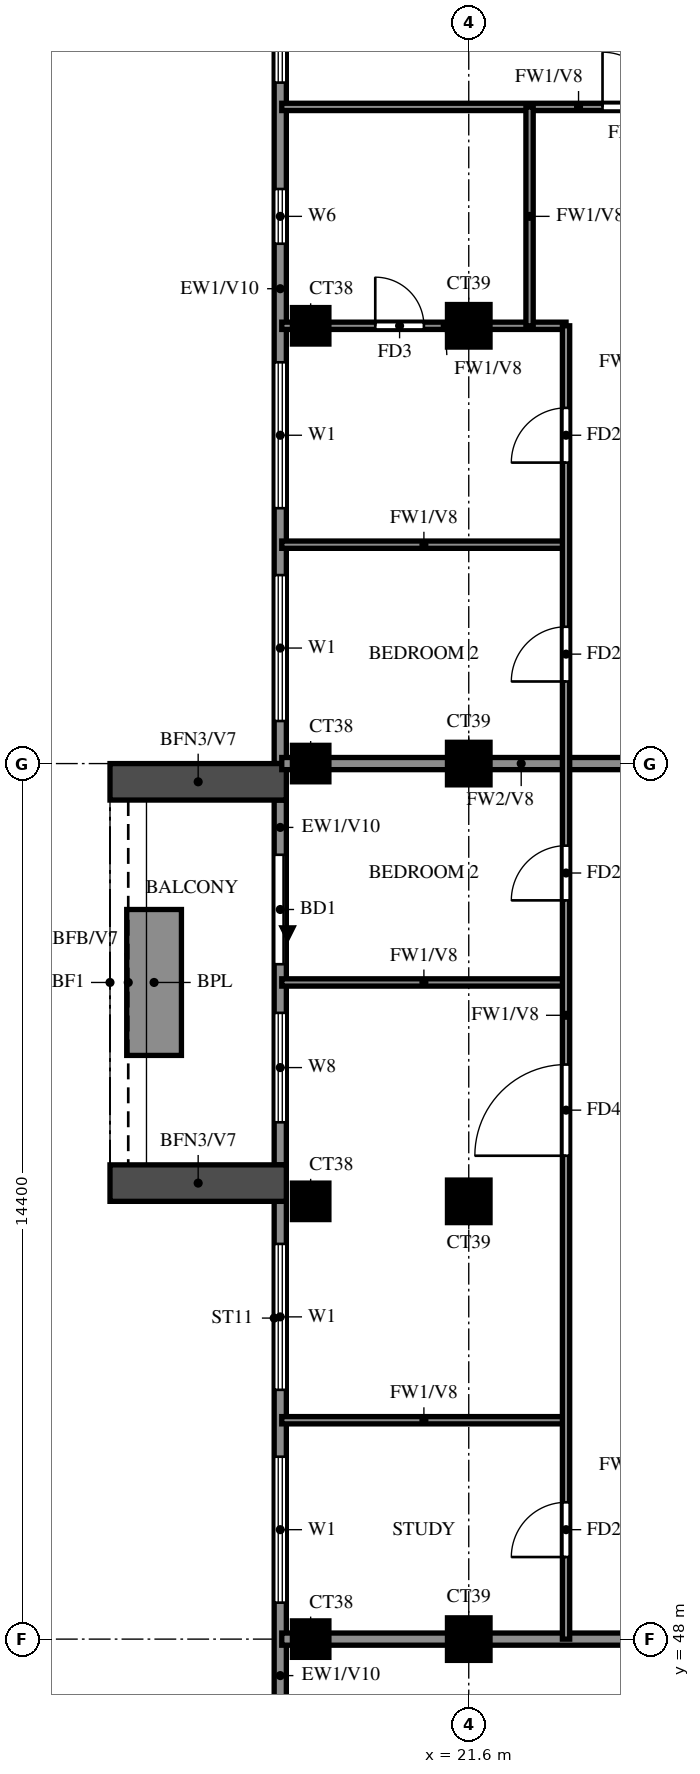
"""IFC4 building model, lengths in metres.
Left out: names, types, materials, properties, quantities, classifications, styles, units other than length and angle.
Written with IfcOpenShell. Run it as: python <this file> out.ifc"""

import sys

from ifc_helpers import new_model, si_unit, direction, frame, frame_2d, origin, origin_2d, place, context, subcontext, project, spatial, rectangle, extrude, source, transform, mapped, element, fill, save


model = new_model("IFC4")
c1 = context("Model", 3, precision=1e-05, world=origin(), true_north=direction((0.0, 1.0)))
c2 = subcontext(c1, "Body", "Model", "MODEL_VIEW")
j1 = project(units=[si_unit("LENGTHUNIT", "METRE"), si_unit("PLANEANGLEUNIT", "RADIAN")], contexts=[c1])
p1 = place(None, origin())
s1 = spatial("IfcSite", under=j1, at=p1, CompositionType="ELEMENT")
p2 = place(p1, origin())
s2 = spatial("IfcBuilding", under=s1, at=p2, CompositionType="ELEMENT")
p3 = place(p2, frame((0.0, 0.0, 267.5)))
s3 = spatial("IfcBuildingStorey", under=s2, at=p3, CompositionType="ELEMENT", Elevation=267.5)
m1 = source(origin(), c2, "Body", "SweptSolid", [
    extrude(rectangle(XDim=0.6, YDim=0.6, at=origin_2d()), origin(), (0.0, 0.0, 1.0), 3.099),
])
p4 = place(p3, frame((19.0, 48.0, 0.0), z_axis=(0.0, 0.0, 1.0), x_axis=(1.0, 0.0, 0.0)))
e1 = element("IfcColumn", 1, at=p4, inside=s3, PredefinedType="COLUMN", context=c2, shape_type="MappedRepresentation", body=[
    mapped(m1, transform((0.0, 0.0, 0.0))),
])
m2 = source(origin(), c2, "Body", "SweptSolid", [
    extrude(rectangle(XDim=0.7, YDim=0.7, at=origin_2d()), origin(), (0.0, 0.0, 1.0), 3.099),
])
p5 = place(p3, frame((21.6, 48.0, 0.0), z_axis=(0.0, 0.0, 1.0), x_axis=(1.0, 0.0, 0.0)))
e2 = element("IfcColumn", 2, at=p5, inside=s3, PredefinedType="COLUMN", context=c2, shape_type="MappedRepresentation", body=[
    mapped(m2, transform((0.0, 0.0, 0.0))),
])
p6 = place(p3, frame((19.0, 55.2, 0.0), z_axis=(0.0, 0.0, 1.0), x_axis=(1.0, 0.0, 0.0)))
e3 = element("IfcColumn", 3, at=p6, inside=s3, PredefinedType="COLUMN", context=c2, shape_type="MappedRepresentation", body=[
    mapped(m1, transform((0.0, 0.0, 0.0))),
])
p7 = place(p3, frame((21.6, 55.2, 0.0), z_axis=(0.0, 0.0, 1.0), x_axis=(1.0, 0.0, 0.0)))
e4 = element("IfcColumn", 4, at=p7, inside=s3, PredefinedType="COLUMN", context=c2, shape_type="MappedRepresentation", body=[
    mapped(m2, transform((0.0, 0.0, 0.0))),
])
p8 = place(p3, frame((19.0, 62.4, 0.0), z_axis=(0.0, 0.0, 1.0), x_axis=(1.0, 0.0, 0.0)))
e5 = element("IfcColumn", 5, at=p8, inside=s3, PredefinedType="COLUMN", context=c2, shape_type="MappedRepresentation", body=[
    mapped(m1, transform((0.0, 0.0, 0.0))),
])
p9 = place(p3, frame((21.6, 62.4, 0.0), z_axis=(0.0, 0.0, 1.0), x_axis=(1.0, 0.0, 0.0)))
e6 = element("IfcColumn", 6, at=p9, inside=s3, PredefinedType="COLUMN", context=c2, shape_type="MappedRepresentation", body=[
    mapped(m2, transform((0.0, 0.0, 0.0))),
])
p10 = place(p3, frame((19.0, 69.6, 0.0), z_axis=(0.0, 0.0, 1.0), x_axis=(1.0, 0.0, 0.0)))
e7 = element("IfcColumn", 7, at=p10, inside=s3, PredefinedType="COLUMN", context=c2, shape_type="MappedRepresentation", body=[
    mapped(m1, transform((0.0, 0.0, 0.0))),
])
p11 = place(p3, frame((21.6, 69.6, 0.0), z_axis=(0.0, 0.0, 1.0), x_axis=(1.0, 0.0, 0.0)))
e8 = element("IfcColumn", 8, at=p11, inside=s3, PredefinedType="COLUMN", context=c2, shape_type="MappedRepresentation", body=[
    mapped(m2, transform((0.0, 0.0, 0.0))),
])
p12 = place(p3, frame((18.5, 76.6, 0.0), z_axis=(0.0, 0.0, 1.0), x_axis=(0.0, -1.0, 0.0)))
e9 = element("IfcWall", 9, at=p12, inside=s3, PredefinedType="SOLIDWALL", context=c2, shape_type="SweptSolid", body=[
    extrude(rectangle(XDim=14.2, YDim=0.2, at=frame_2d((7.1, 0.0))), origin(), (0.0, 0.0, 1.0), 3.099),
])
p13 = place(p12, frame((11.1, 0.0, 0.6)))
e10 = element("IfcOpeningElement", 10, at=p13, cuts=e9, PredefinedType="OPENING", context=c2, shape_type="SweptSolid", body=[
    extrude(rectangle(XDim=2.4, YDim=2.4, at=frame_2d((1.2, 1.2))), frame((0.0, 0.11, 0.0), z_axis=(0.0, -1.0, 0.0), x_axis=(1.0, 0.0, 0.0)), (0.0, 0.0, 1.0), 0.22),
])
p14 = place(p12, frame((7.6, 0.0, 0.6)))
e11 = element("IfcOpeningElement", 11, at=p14, cuts=e9, PredefinedType="OPENING", context=c2, shape_type="SweptSolid", body=[
    extrude(rectangle(XDim=2.4, YDim=2.4, at=frame_2d((1.2, 1.2))), frame((0.0, 0.11, 0.0), z_axis=(0.0, -1.0, 0.0), x_axis=(1.0, 0.0, 0.0)), (0.0, 0.0, 1.0), 0.22),
])
p15 = place(p12, frame((4.75, 0.0, 1.5)))
e12 = element("IfcOpeningElement", 12, at=p15, cuts=e9, PredefinedType="OPENING", context=c2, shape_type="SweptSolid", body=[
    extrude(rectangle(XDim=0.9, YDim=0.9, at=frame_2d((0.45, 0.45))), frame((0.0, 0.11, 0.0), z_axis=(0.0, -1.0, 0.0), x_axis=(1.0, 0.0, 0.0)), (0.0, 0.0, 1.0), 0.22),
])
p16 = place(p12, frame((0.6, 0.0, 0.6)))
e13 = element("IfcOpeningElement", 13, at=p16, cuts=e9, PredefinedType="OPENING", context=c2, shape_type="SweptSolid", body=[
    extrude(rectangle(XDim=2.4, YDim=2.4, at=frame_2d((1.2, 1.2))), frame((0.0, 0.11, 0.0), z_axis=(0.0, -1.0, 0.0), x_axis=(1.0, 0.0, 0.0)), (0.0, 0.0, 1.0), 0.22),
])
p17 = place(p3, frame((18.5, 61.8, 0.0), z_axis=(0.0, 0.0, 1.0), x_axis=(0.0, -1.0, 0.0)))
e14 = element("IfcWall", 14, at=p17, inside=s3, PredefinedType="SOLIDWALL", context=c2, shape_type="SweptSolid", body=[
    extrude(rectangle(XDim=6.0, YDim=0.2, at=frame_2d((3.0, 0.0))), origin(), (0.0, 0.0, 1.0), 3.099),
])
p18 = place(p17, frame((0.9, 0.0, 0.0)))
e15 = element("IfcOpeningElement", 15, at=p18, cuts=e14, PredefinedType="OPENING", context=c2, shape_type="SweptSolid", body=[
    extrude(rectangle(XDim=1.8, YDim=2.4, at=frame_2d((0.9, 1.2))), frame((0.0, 0.11, 0.0), z_axis=(0.0, -1.0, 0.0), x_axis=(1.0, 0.0, 0.0)), (0.0, 0.0, 1.0), 0.22),
])
p19 = place(p17, frame((3.5, 0.0, 0.6)))
e16 = element("IfcOpeningElement", 16, at=p19, cuts=e14, PredefinedType="OPENING", context=c2, shape_type="SweptSolid", body=[
    extrude(rectangle(XDim=1.8, YDim=2.4, at=frame_2d((0.9, 1.2))), frame((0.0, 0.11, 0.0), z_axis=(0.0, -1.0, 0.0), x_axis=(1.0, 0.0, 0.0)), (0.0, 0.0, 1.0), 0.22),
])
p20 = place(p3, frame((18.5, 55.2, 0.0), z_axis=(0.0, 0.0, 1.0), x_axis=(0.0, -1.0, 0.0)))
e17 = element("IfcWall", 17, at=p20, inside=s3, PredefinedType="SOLIDWALL", context=c2, shape_type="SweptSolid", body=[
    extrude(rectangle(XDim=12.0, YDim=0.2, at=frame_2d((6.0, 0.0))), origin(), (0.0, 0.0, 1.0), 3.099),
])
p21 = place(p20, frame((8.3, 0.0, 0.6)))
e18 = element("IfcOpeningElement", 18, at=p21, cuts=e17, PredefinedType="OPENING", context=c2, shape_type="SweptSolid", body=[
    extrude(rectangle(XDim=2.4, YDim=2.4, at=frame_2d((1.2, 1.2))), frame((0.0, 0.11, 0.0), z_axis=(0.0, -1.0, 0.0), x_axis=(1.0, 0.0, 0.0)), (0.0, 0.0, 1.0), 0.22),
])
p22 = place(p20, frame((4.2, 0.0, 0.6)))
e19 = element("IfcOpeningElement", 19, at=p22, cuts=e17, PredefinedType="OPENING", context=c2, shape_type="SweptSolid", body=[
    extrude(rectangle(XDim=2.4, YDim=2.4, at=frame_2d((1.2, 1.2))), frame((0.0, 0.11, 0.0), z_axis=(0.0, -1.0, 0.0), x_axis=(1.0, 0.0, 0.0)), (0.0, 0.0, 1.0), 0.22),
])
p23 = place(p20, frame((0.7, 0.0, 0.6)))
e20 = element("IfcOpeningElement", 20, at=p23, cuts=e17, PredefinedType="OPENING", context=c2, shape_type="SweptSolid", body=[
    extrude(rectangle(XDim=2.4, YDim=2.4, at=frame_2d((1.2, 1.2))), frame((0.0, 0.11, 0.0), z_axis=(0.0, -1.0, 0.0), x_axis=(1.0, 0.0, 0.0)), (0.0, 0.0, 1.0), 0.22),
])
for number, where, z_axis, x_axis in (
    (21, (18.6, 62.1, 0.0), (0.0, 0.0, 1.0), (-1.0, 0.0, 0.0)),
    (22, (18.6, 55.5, 0.0), (0.0, 0.0, 1.0), (-1.0, 0.0, 0.0)),
):
    element("IfcWall", number, at=place(p3, frame(where, z_axis=z_axis, x_axis=x_axis)), inside=s3, PredefinedType="SOLIDWALL", context=c2, shape_type="SweptSolid", body=[
        extrude(rectangle(XDim=2.9, YDim=0.6, at=frame_2d((1.45, 0.0))), origin(), (0.0, 0.0, 1.0), 2.729),
    ])
p24 = place(p3, frame((16.425, 60.0, 0.0), z_axis=(0.0, 0.0, 1.0), x_axis=(0.0, -1.0, 0.0)))
e23 = element("IfcWall", 23, at=p24, inside=s3, PredefinedType="SOLIDWALL", context=c2, shape_type="SweptSolid", body=[
    extrude(rectangle(XDim=2.4, YDim=0.9, at=frame_2d((1.2, 0.0))), origin(), (0.0, 0.0, 1.0), 0.9),
])
p25 = place(p3, frame((18.525, 48.0, 0.0), z_axis=(0.0, 0.0, 1.0), x_axis=(1.0, 0.0, 0.0)))
e24 = element("IfcWall", 24, at=p25, inside=s3, PredefinedType="SOLIDWALL", context=c2, shape_type="SweptSolid", body=[
    extrude(rectangle(XDim=15.075, YDim=0.2, at=frame_2d((7.538, 0.0))), origin(), (0.0, 0.0, 1.0), 3.099),
])
p26 = place(p3, frame((18.525, 62.4, 0.0), z_axis=(0.0, 0.0, 1.0), x_axis=(1.0, 0.0, 0.0)))
e25 = element("IfcWall", 25, at=p26, inside=s3, PredefinedType="SOLIDWALL", context=c2, shape_type="SweptSolid", body=[
    extrude(rectangle(XDim=7.875, YDim=0.2, at=frame_2d((3.938, 0.0))), origin(), (0.0, 0.0, 1.0), 3.099),
])
for number, where, z_axis, x_axis in (
    (26, (18.525, 51.6, 0.0), (0.0, 0.0, 1.0), (1.0, 0.0, 0.0)),
    (27, (18.525, 58.8, 0.0), (0.0, 0.0, 1.0), (1.0, 0.0, 0.0)),
    (28, (18.525, 66.0, 0.0), (0.0, 0.0, 1.0), (1.0, 0.0, 0.0)),
):
    element("IfcWall", number, at=place(p3, frame(where, z_axis=z_axis, x_axis=x_axis)), inside=s3, PredefinedType="PARTITIONING", context=c2, shape_type="SweptSolid", body=[
        extrude(rectangle(XDim=4.675, YDim=0.12, at=frame_2d((2.337, 0.0))), origin(), (0.0, 0.0, 1.0), 3.099),
    ])
p27 = place(p3, frame((18.525, 69.6, 0.0), z_axis=(0.0, 0.0, 1.0), x_axis=(1.0, 0.0, 0.0)))
e29 = element("IfcWall", 29, at=p27, inside=s3, PredefinedType="PARTITIONING", context=c2, shape_type="SweptSolid", body=[
    extrude(rectangle(XDim=4.675, YDim=0.12, at=frame_2d((2.337, 0.0))), origin(), (0.0, 0.0, 1.0), 3.099),
])
p28 = place(p27, frame((1.538, 0.0, 0.0)))
e30 = element("IfcOpeningElement", 30, at=p28, cuts=e29, PredefinedType="OPENING", context=c2, shape_type="SweptSolid", body=[
    extrude(rectangle(XDim=0.8, YDim=2.1, at=frame_2d((0.4, 1.05))), frame((0.0, 0.07, 0.0), z_axis=(0.0, -1.0, 0.0), x_axis=(1.0, 0.0, 0.0)), (0.0, 0.0, 1.0), 0.14),
])
p29 = place(p3, frame((18.525, 73.2, 0.0), z_axis=(0.0, 0.0, 1.0), x_axis=(1.0, 0.0, 0.0)))
e31 = element("IfcWall", 31, at=p29, inside=s3, PredefinedType="PARTITIONING", context=c2, shape_type="SweptSolid", body=[
    extrude(rectangle(XDim=10.275, YDim=0.12, at=frame_2d((5.138, 0.0))), origin(), (0.0, 0.0, 1.0), 3.099),
])
p30 = place(p29, frame((5.275, 0.0, 0.0)))
e32 = element("IfcOpeningElement", 32, at=p30, cuts=e31, PredefinedType="OPENING", context=c2, shape_type="SweptSolid", body=[
    extrude(rectangle(XDim=0.9, YDim=2.1, at=frame_2d((0.45, 1.05))), frame((0.0, 0.07, 0.0), z_axis=(0.0, -1.0, 0.0), x_axis=(1.0, 0.0, 0.0)), (0.0, 0.0, 1.0), 0.14),
])
p31 = place(p3, frame((22.6, 69.6, 0.0), z_axis=(0.0, 0.0, 1.0), x_axis=(0.0, 1.0, 0.0)))
e33 = element("IfcWall", 33, at=p31, inside=s3, PredefinedType="PARTITIONING", context=c2, shape_type="SweptSolid", body=[
    extrude(rectangle(XDim=3.6, YDim=0.12, at=frame_2d((1.8, 0.0))), origin(), (0.0, 0.0, 1.0), 3.099),
])
p32 = place(p3, frame((23.2, 48.0, 0.0), z_axis=(0.0, 0.0, 1.0), x_axis=(0.0, 1.0, 0.0)))
e34 = element("IfcWall", 34, at=p32, inside=s3, PredefinedType="PARTITIONING", context=c2, shape_type="SweptSolid", body=[
    extrude(rectangle(XDim=21.6, YDim=0.12, at=frame_2d((10.8, 0.0))), origin(), (0.0, 0.0, 1.0), 3.099),
])
p33 = place(p32, frame((1.35, 0.0, 0.0)))
e35 = element("IfcOpeningElement", 35, at=p33, cuts=e34, PredefinedType="OPENING", context=c2, shape_type="SweptSolid", body=[
    extrude(rectangle(XDim=0.9, YDim=2.1, at=frame_2d((0.45, 1.05))), frame((0.0, 0.07, 0.0), z_axis=(0.0, -1.0, 0.0), x_axis=(1.0, 0.0, 0.0)), (0.0, 0.0, 1.0), 0.14),
])
p34 = place(p32, frame((7.95, 0.0, 0.0)))
e36 = element("IfcOpeningElement", 36, at=p34, cuts=e34, PredefinedType="OPENING", context=c2, shape_type="SweptSolid", body=[
    extrude(rectangle(XDim=1.5, YDim=2.1, at=frame_2d((0.75, 1.05))), frame((0.0, 0.07, 0.0), z_axis=(0.0, -1.0, 0.0), x_axis=(1.0, 0.0, 0.0)), (0.0, 0.0, 1.0), 0.14),
])
p35 = place(p32, frame((12.15, 0.0, 0.0)))
e37 = element("IfcOpeningElement", 37, at=p35, cuts=e34, PredefinedType="OPENING", context=c2, shape_type="SweptSolid", body=[
    extrude(rectangle(XDim=0.9, YDim=2.1, at=frame_2d((0.45, 1.05))), frame((0.0, 0.07, 0.0), z_axis=(0.0, -1.0, 0.0), x_axis=(1.0, 0.0, 0.0)), (0.0, 0.0, 1.0), 0.14),
])
p36 = place(p32, frame((15.75, 0.0, 0.0)))
e38 = element("IfcOpeningElement", 38, at=p36, cuts=e34, PredefinedType="OPENING", context=c2, shape_type="SweptSolid", body=[
    extrude(rectangle(XDim=0.9, YDim=2.1, at=frame_2d((0.45, 1.05))), frame((0.0, 0.07, 0.0), z_axis=(0.0, -1.0, 0.0), x_axis=(1.0, 0.0, 0.0)), (0.0, 0.0, 1.0), 0.14),
])
p37 = place(p32, frame((19.35, 0.0, 0.0)))
e39 = element("IfcOpeningElement", 39, at=p37, cuts=e34, PredefinedType="OPENING", context=c2, shape_type="SweptSolid", body=[
    extrude(rectangle(XDim=0.9, YDim=2.1, at=frame_2d((0.45, 1.05))), frame((0.0, 0.07, 0.0), z_axis=(0.0, -1.0, 0.0), x_axis=(1.0, 0.0, 0.0)), (0.0, 0.0, 1.0), 0.14),
])
p38 = place(p13, origin())
e40 = element("IfcWindow", 40, at=p38, inside=s3, PartitioningType="DOUBLE_PANEL_VERTICAL", PredefinedType="WINDOW", context=c2, shape_type="SweptSolid", body=[
    extrude(rectangle(XDim=2.4, YDim=2.4, at=frame_2d((1.2, 1.2))), frame((0.0, 0.03, 0.0), z_axis=(0.0, -1.0, 0.0), x_axis=(1.0, 0.0, 0.0)), (0.0, 0.0, 1.0), 0.06),
])
fill(e10, e40)
p39 = place(p14, origin())
e41 = element("IfcWindow", 41, at=p39, inside=s3, PartitioningType="DOUBLE_PANEL_VERTICAL", PredefinedType="WINDOW", context=c2, shape_type="SweptSolid", body=[
    extrude(rectangle(XDim=2.4, YDim=2.4, at=frame_2d((1.2, 1.2))), frame((0.0, 0.03, 0.0), z_axis=(0.0, -1.0, 0.0), x_axis=(1.0, 0.0, 0.0)), (0.0, 0.0, 1.0), 0.06),
])
fill(e11, e41)
p40 = place(p15, origin())
e42 = element("IfcWindow", 42, at=p40, inside=s3, PartitioningType="SINGLE_PANEL", PredefinedType="WINDOW", context=c2, shape_type="SweptSolid", body=[
    extrude(rectangle(XDim=0.9, YDim=0.9, at=frame_2d((0.45, 0.45))), frame((0.0, 0.03, 0.0), z_axis=(0.0, -1.0, 0.0), x_axis=(1.0, 0.0, 0.0)), (0.0, 0.0, 1.0), 0.06),
])
fill(e12, e42)
p41 = place(p16, origin())
e43 = element("IfcWindow", 43, at=p41, inside=s3, PartitioningType="DOUBLE_PANEL_VERTICAL", PredefinedType="WINDOW", context=c2, shape_type="SweptSolid", body=[
    extrude(rectangle(XDim=2.4, YDim=2.4, at=frame_2d((1.2, 1.2))), frame((0.0, 0.03, 0.0), z_axis=(0.0, -1.0, 0.0), x_axis=(1.0, 0.0, 0.0)), (0.0, 0.0, 1.0), 0.06),
])
fill(e13, e43)
p42 = place(p18, origin())
e44 = element("IfcDoor", 44, at=p42, inside=s3, OperationType="DOUBLE_DOOR_SLIDING", PredefinedType="DOOR", context=c2, shape_type="SweptSolid", body=[
    extrude(rectangle(XDim=1.8, YDim=2.4, at=frame_2d((0.9, 1.2))), frame((0.0, 0.025, 0.0), z_axis=(0.0, -1.0, 0.0), x_axis=(1.0, 0.0, 0.0)), (0.0, 0.0, 1.0), 0.05),
])
fill(e15, e44)
p43 = place(p19, origin())
e45 = element("IfcWindow", 45, at=p43, inside=s3, PartitioningType="DOUBLE_PANEL_VERTICAL", PredefinedType="WINDOW", context=c2, shape_type="SweptSolid", body=[
    extrude(rectangle(XDim=1.8, YDim=2.4, at=frame_2d((0.9, 1.2))), frame((0.0, 0.03, 0.0), z_axis=(0.0, -1.0, 0.0), x_axis=(1.0, 0.0, 0.0)), (0.0, 0.0, 1.0), 0.06),
])
fill(e16, e45)
p44 = place(p22, origin())
e46 = element("IfcWindow", 46, at=p44, inside=s3, PartitioningType="DOUBLE_PANEL_VERTICAL", PredefinedType="WINDOW", context=c2, shape_type="SweptSolid", body=[
    extrude(rectangle(XDim=2.4, YDim=2.4, at=frame_2d((1.2, 1.2))), frame((0.0, 0.03, 0.0), z_axis=(0.0, -1.0, 0.0), x_axis=(1.0, 0.0, 0.0)), (0.0, 0.0, 1.0), 0.06),
])
fill(e19, e46)
p45 = place(p23, origin())
e47 = element("IfcWindow", 47, at=p45, inside=s3, PartitioningType="DOUBLE_PANEL_VERTICAL", PredefinedType="WINDOW", context=c2, shape_type="SweptSolid", body=[
    extrude(rectangle(XDim=2.4, YDim=2.4, at=frame_2d((1.2, 1.2))), frame((0.0, 0.03, 0.0), z_axis=(0.0, -1.0, 0.0), x_axis=(1.0, 0.0, 0.0)), (0.0, 0.0, 1.0), 0.06),
])
fill(e20, e47)
p46 = place(p33, origin())
e48 = element("IfcDoor", 48, at=p46, inside=s3, OperationType="SINGLE_SWING_LEFT", PredefinedType="DOOR", context=c2, shape_type="SweptSolid", body=[
    extrude(rectangle(XDim=0.9, YDim=2.1, at=frame_2d((0.45, 1.05))), frame((0.0, 0.025, 0.0), z_axis=(0.0, -1.0, 0.0), x_axis=(1.0, 0.0, 0.0)), (0.0, 0.0, 1.0), 0.05),
])
fill(e35, e48)
p47 = place(p34, origin())
e49 = element("IfcDoor", 49, at=p47, inside=s3, OperationType="SINGLE_SWING_RIGHT", PredefinedType="DOOR", context=c2, shape_type="SweptSolid", body=[
    extrude(rectangle(XDim=1.5, YDim=2.1, at=frame_2d((0.75, 1.05))), frame((0.0, 0.025, 0.0), z_axis=(0.0, -1.0, 0.0), x_axis=(1.0, 0.0, 0.0)), (0.0, 0.0, 1.0), 0.05),
])
fill(e36, e49)
p48 = place(p35, origin())
e50 = element("IfcDoor", 50, at=p48, inside=s3, OperationType="SINGLE_SWING_RIGHT", PredefinedType="DOOR", context=c2, shape_type="SweptSolid", body=[
    extrude(rectangle(XDim=0.9, YDim=2.1, at=frame_2d((0.45, 1.05))), frame((0.0, 0.025, 0.0), z_axis=(0.0, -1.0, 0.0), x_axis=(1.0, 0.0, 0.0)), (0.0, 0.0, 1.0), 0.05),
])
fill(e37, e50)
p49 = place(p36, origin())
e51 = element("IfcDoor", 51, at=p49, inside=s3, OperationType="SINGLE_SWING_LEFT", PredefinedType="DOOR", context=c2, shape_type="SweptSolid", body=[
    extrude(rectangle(XDim=0.9, YDim=2.1, at=frame_2d((0.45, 1.05))), frame((0.0, 0.025, 0.0), z_axis=(0.0, -1.0, 0.0), x_axis=(1.0, 0.0, 0.0)), (0.0, 0.0, 1.0), 0.05),
])
fill(e38, e51)
p50 = place(p37, origin())
e52 = element("IfcDoor", 52, at=p50, inside=s3, OperationType="SINGLE_SWING_RIGHT", PredefinedType="DOOR", context=c2, shape_type="SweptSolid", body=[
    extrude(rectangle(XDim=0.9, YDim=2.1, at=frame_2d((0.45, 1.05))), frame((0.0, 0.025, 0.0), z_axis=(0.0, -1.0, 0.0), x_axis=(1.0, 0.0, 0.0)), (0.0, 0.0, 1.0), 0.05),
])
fill(e39, e52)
p51 = place(p28, origin())
e53 = element("IfcDoor", 53, at=p51, inside=s3, OperationType="SINGLE_SWING_RIGHT", PredefinedType="DOOR", context=c2, shape_type="SweptSolid", body=[
    extrude(rectangle(XDim=0.8, YDim=2.1, at=frame_2d((0.4, 1.05))), frame((0.0, 0.025, 0.0), z_axis=(0.0, -1.0, 0.0), x_axis=(1.0, 0.0, 0.0)), (0.0, 0.0, 1.0), 0.05),
])
fill(e30, e53)
p52 = place(p30, origin())
e54 = element("IfcDoor", 54, at=p52, inside=s3, OperationType="SINGLE_SWING_LEFT", PredefinedType="DOOR", context=c2, shape_type="SweptSolid", body=[
    extrude(rectangle(XDim=0.9, YDim=2.1, at=frame_2d((0.45, 1.05))), frame((0.0, 0.025, 0.0), z_axis=(0.0, -1.0, 0.0), x_axis=(1.0, 0.0, 0.0)), (0.0, 0.0, 1.0), 0.05),
])
fill(e32, e54)
save(model, sys.argv[1])
